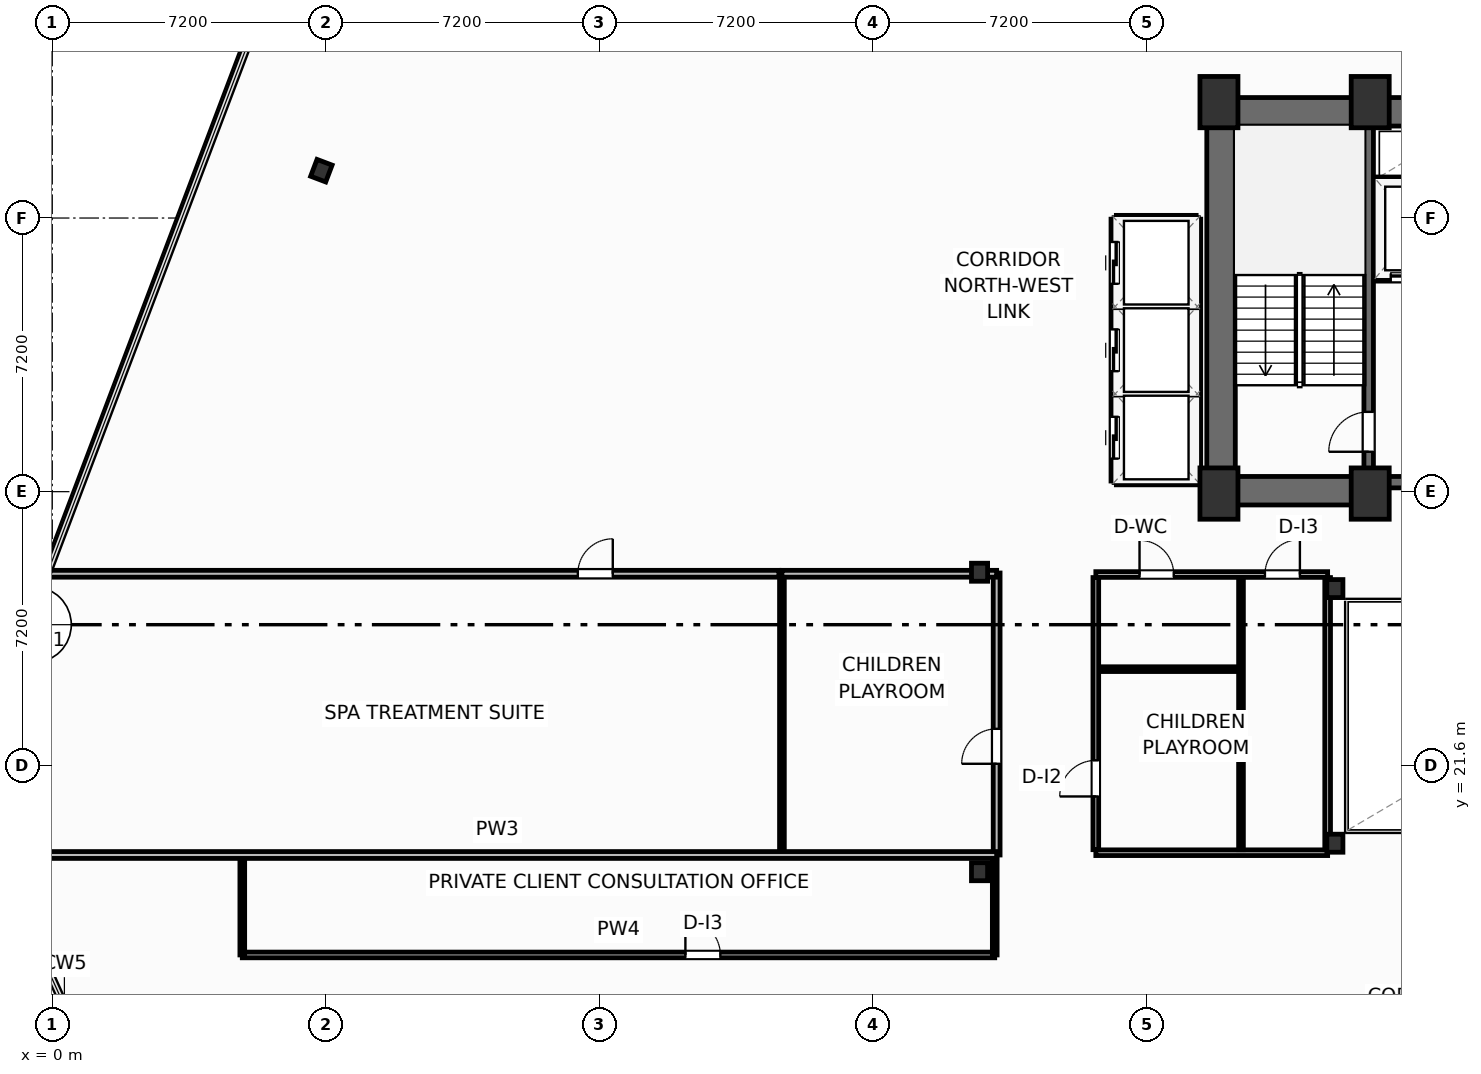
"""IFC4 building model, lengths in metres.
Left out: names, types, materials, properties, quantities, classifications, styles, units other than length and angle.
Written with IfcOpenShell. Run it as: python <this file> out.ifc"""

import sys

from ifc_helpers import new_model, si_unit, direction, frame, frame_2d, origin, origin_2d, place, context, subcontext, project, spatial, rectangle, i_section, extrude, element, fill, save


model = new_model("IFC4")
c1 = context("Model", 3, precision=1e-05, world=origin(), true_north=direction((0.0, 1.0)))
c2 = subcontext(c1, "Body", "Model", "MODEL_VIEW")
j1 = project(units=[si_unit("LENGTHUNIT", "METRE"), si_unit("PLANEANGLEUNIT", "RADIAN")], contexts=[c1])
p1 = place(None, origin())
s1 = spatial("IfcSite", under=j1, at=p1, CompositionType="ELEMENT")
p2 = place(p1, origin())
s2 = spatial("IfcBuilding", under=s1, at=p2, CompositionType="ELEMENT")
p3 = place(p2, frame((0.0, 0.0, 91.0)))
s3 = spatial("IfcBuildingStorey", under=s2, at=p3, CompositionType="ELEMENT", Elevation=91.0)
for number, where, z_axis, x_axis in (
    (1, (30.7, 28.75, 0.0), (0.0, 0.0, 1.0), (1.0, 0.0, 0.0)),
    (2, (34.68, 28.75, 0.0), (0.0, 0.0, 1.0), (1.0, 0.0, 0.0)),
    (3, (30.7, 39.05, 0.0), (0.0, 0.0, 1.0), (1.0, 0.0, 0.0)),
    (4, (34.68, 39.05, 0.0), (0.0, 0.0, 1.0), (1.0, 0.0, 0.0)),
):
    element("IfcColumn", number, at=place(p3, frame(where, z_axis=z_axis, x_axis=x_axis)), inside=s3, PredefinedType="COLUMN", context=c2, shape_type="SweptSolid", body=[
        extrude(rectangle(XDim=1.0, YDim=1.35, at=origin_2d()), origin(), (0.0, 0.0, 1.0), 3.7),
    ])
for number, where, z_axis, x_axis in (
    (5, (33.75, 19.55, 0.0), (0.0, 0.0, 1.0), (1.0, 0.0, 0.0)),
    (6, (33.75, 26.25, 0.0), (0.0, 0.0, 1.0), (1.0, 0.0, 0.0)),
    (7, (24.4, 18.8, 0.0), (0.0, 0.0, 1.0), (1.0, 0.0, 0.0)),
    (8, (24.4, 26.68, 0.0), (0.0, 0.0, 1.0), (1.0, 0.0, 0.0)),
):
    element("IfcColumn", number, at=place(p3, frame(where, z_axis=z_axis, x_axis=x_axis)), inside=s3, PredefinedType="COLUMN", context=c2, shape_type="SweptSolid", body=[
        extrude(i_section(OverallWidth=0.424, OverallDepth=0.474, WebThickness=0.048, FlangeThickness=0.077, FilletRadius=0.025, at=origin_2d()), origin(), (0.0, 0.0, 1.0), 3.7),
    ])
p4 = place(p3, frame((30.38, 38.795, 0.0), z_axis=(0.0, 0.0, 1.0), x_axis=(1.0, 0.0, 0.0)))
e9 = element("IfcWall", 9, at=p4, inside=s3, PredefinedType="SHEAR", context=c2, shape_type="SweptSolid", body=[
    extrude(rectangle(XDim=17.64, YDim=0.75, at=frame_2d((8.82, 0.0))), origin(), (0.0, 0.0, 1.0), 3.45),
])
p5 = place(p3, frame((30.755, 29.2, 0.0), z_axis=(0.0, 0.0, 1.0), x_axis=(0.0, 1.0, 0.0)))
e10 = element("IfcWall", 10, at=p5, inside=s3, PredefinedType="SHEAR", context=c2, shape_type="SweptSolid", body=[
    extrude(rectangle(XDim=9.22, YDim=0.75, at=frame_2d((4.61, 0.0))), origin(), (0.0, 0.0, 1.0), 3.45),
])
p6 = place(p3, frame((30.38, 28.825, 0.0), z_axis=(0.0, 0.0, 1.0), x_axis=(1.0, 0.0, 0.0)))
e11 = element("IfcWall", 11, at=p6, inside=s3, PredefinedType="SHEAR", context=c2, shape_type="SweptSolid", body=[
    extrude(rectangle(XDim=4.42, YDim=0.75, at=frame_2d((2.21, 0.0))), origin(), (0.0, 0.0, 1.0), 3.45),
])
p7 = place(p3, frame((34.8, 29.05, 0.0), z_axis=(0.0, 0.0, 1.0), x_axis=(1.0, 0.0, 0.0)))
e12 = element("IfcWall", 12, at=p7, inside=s3, PredefinedType="SHEAR", context=c2, shape_type="SweptSolid", body=[
    extrude(rectangle(XDim=8.8, YDim=0.3, at=frame_2d((4.4, 0.0))), origin(), (0.0, 0.0, 1.0), 3.45),
])
p8 = place(p7, frame((0.95, 0.0, 0.0)))
e13 = element("IfcOpeningElement", 13, at=p8, cuts=e12, PredefinedType="OPENING", context=c2, shape_type="SweptSolid", body=[
    extrude(rectangle(XDim=1.1, YDim=2.15, at=frame_2d((0.55, 1.075))), frame((0.0, 0.16, 0.0), z_axis=(0.0, -1.0, 0.0), x_axis=(1.0, 0.0, 0.0)), (0.0, 0.0, 1.0), 0.32),
])
p9 = place(p7, frame((6.75, 0.0, 0.0)))
e14 = element("IfcOpeningElement", 14, at=p9, cuts=e12, PredefinedType="OPENING", context=c2, shape_type="SweptSolid", body=[
    extrude(rectangle(XDim=1.1, YDim=2.15, at=frame_2d((0.55, 1.075))), frame((0.0, 0.16, 0.0), z_axis=(0.0, -1.0, 0.0), x_axis=(1.0, 0.0, 0.0)), (0.0, 0.0, 1.0), 0.32),
])
p10 = place(p7, frame((3.32, 0.0, 0.0)))
e15 = element("IfcOpeningElement", 15, at=p10, cuts=e12, PredefinedType="OPENING", context=c2, shape_type="SweptSolid", body=[
    extrude(rectangle(XDim=0.95, YDim=2.15, at=frame_2d((0.475, 1.075))), frame((0.0, 0.16, 0.0), z_axis=(0.0, -1.0, 0.0), x_axis=(1.0, 0.0, 0.0)), (0.0, 0.0, 1.0), 0.32),
])
p11 = place(p3, frame((34.64, 29.2, 0.0), z_axis=(0.0, 0.0, 1.0), x_axis=(0.0, 1.0, 0.0)))
e16 = element("IfcWall", 16, at=p11, inside=s3, PredefinedType="SHEAR", context=c2, shape_type="SweptSolid", body=[
    extrude(rectangle(XDim=9.22, YDim=0.25, at=frame_2d((4.61, 0.0))), origin(), (0.0, 0.0, 1.0), 3.45),
])
p12 = place(p11, frame((0.65, 0.0, 0.0)))
e17 = element("IfcOpeningElement", 17, at=p12, cuts=e16, PredefinedType="OPENING", context=c2, shape_type="SweptSolid", body=[
    extrude(rectangle(XDim=1.05, YDim=2.15, at=frame_2d((0.525, 1.075))), frame((0.0, 0.135, 0.0), z_axis=(0.0, -1.0, 0.0), x_axis=(1.0, 0.0, 0.0)), (0.0, 0.0, 1.0), 0.27),
])
p13 = place(p3, frame((7.081, 37.246, 0.0), z_axis=(0.0, 0.0, 1.0), x_axis=(0.935221751401, -0.354062530786, 0.0)))
e18 = element("IfcColumn", 18, at=p13, inside=s3, PredefinedType="COLUMN", context=c2, shape_type="SweptSolid", body=[
    extrude(i_section(OverallWidth=0.424, OverallDepth=0.474, WebThickness=0.048, FlangeThickness=0.077, FilletRadius=0.025, at=origin_2d()), origin(), (0.0, 0.0, 1.0), 3.7),
])
p14 = place(p3, frame((5.0, 16.61, 0.0), z_axis=(0.0, 0.0, 1.0), x_axis=(1.0, 0.0, 0.0)))
e19 = element("IfcWall", 19, at=p14, inside=s3, PredefinedType="PARTITIONING", context=c2, shape_type="SweptSolid", body=[
    extrude(rectangle(XDim=19.8, YDim=0.15, at=frame_2d((9.9, 0.0))), origin(), (0.0, 0.0, 1.0), 3.45),
])
p15 = place(p14, frame((11.66, 0.0, 0.0)))
e20 = element("IfcOpeningElement", 20, at=p15, cuts=e19, PredefinedType="OPENING", context=c2, shape_type="SweptSolid", body=[
    extrude(rectangle(XDim=0.92, YDim=2.05, at=frame_2d((0.46, 1.025))), frame((0.0, 0.085, 0.0), z_axis=(0.0, -1.0, 0.0), x_axis=(1.0, 0.0, 0.0)), (0.0, 0.0, 1.0), 0.17),
])
for number, where, z_axis, x_axis in (
    (21, (5.0, 16.61, 0.0), (0.0, 0.0, 1.0), (0.0, 1.0, 0.0)),
    (22, (24.8, 16.61, 0.0), (0.0, 0.0, 1.0), (0.0, 1.0, 0.0)),
):
    element("IfcWall", number, at=place(p3, frame(where, z_axis=z_axis, x_axis=x_axis)), inside=s3, PredefinedType="PARTITIONING", context=c2, shape_type="SweptSolid", body=[
        extrude(rectangle(XDim=2.63, YDim=0.125, at=frame_2d((1.315, 0.0))), origin(), (0.0, 0.0, 1.0), 3.45),
    ])
p16 = place(p3, frame((-0.094, 26.64, 0.0), z_axis=(0.0, 0.0, 1.0), x_axis=(1.0, 0.0, 0.0)))
e23 = element("IfcWall", 23, at=p16, inside=s3, PredefinedType="PARTITIONING", context=c2, shape_type="SweptSolid", body=[
    extrude(rectangle(XDim=19.214, YDim=0.18, at=frame_2d((9.607, 0.0))), origin(), (0.0, 0.0, 1.0), 3.45),
])
p17 = place(p16, frame((13.923, 0.0, 0.0)))
e24 = element("IfcOpeningElement", 24, at=p17, cuts=e23, PredefinedType="OPENING", context=c2, shape_type="SweptSolid", body=[
    extrude(rectangle(XDim=0.92, YDim=2.05, at=frame_2d((0.46, 1.025))), frame((0.0, 0.1, 0.0), z_axis=(0.0, -1.0, 0.0), x_axis=(1.0, 0.0, 0.0)), (0.0, 0.0, 1.0), 0.2),
])
p18 = place(p3, frame((24.85, 19.24, 0.0), z_axis=(0.0, 0.0, 1.0), x_axis=(0.0, 1.0, 0.0)))
e25 = element("IfcWall", 25, at=p18, inside=s3, PredefinedType="PARTITIONING", context=c2, shape_type="SweptSolid", body=[
    extrude(rectangle(XDim=7.42, YDim=0.18, at=frame_2d((3.71, 0.0))), origin(), (0.0, 0.0, 1.0), 3.45),
])
p19 = place(p18, frame((2.4, 0.0, 0.0)))
e26 = element("IfcOpeningElement", 26, at=p19, cuts=e25, PredefinedType="OPENING", context=c2, shape_type="SweptSolid", body=[
    extrude(rectangle(XDim=0.92, YDim=2.05, at=frame_2d((0.46, 1.025))), frame((0.0, 0.1, 0.0), z_axis=(0.0, -1.0, 0.0), x_axis=(1.0, 0.0, 0.0)), (0.0, 0.0, 1.0), 0.2),
])
p20 = place(p3, frame((19.2, 19.24, 0.0), z_axis=(0.0, 0.0, 1.0), x_axis=(0.0, 1.0, 0.0)))
e27 = element("IfcWall", 27, at=p20, inside=s3, PredefinedType="PARTITIONING", context=c2, shape_type="SweptSolid", body=[
    extrude(rectangle(XDim=7.42, YDim=0.125, at=frame_2d((3.71, 0.0))), origin(), (0.0, 0.0, 1.0), 3.45),
])
p21 = place(p3, frame((-1.432, 19.24, 0.0), z_axis=(0.0, 0.0, 1.0), x_axis=(1.0, 0.0, 0.0)))
e28 = element("IfcWall", 28, at=p21, inside=s3, PredefinedType="PARTITIONING", context=c2, shape_type="SweptSolid", body=[
    extrude(rectangle(XDim=26.282, YDim=0.18, at=frame_2d((13.141, 0.0))), origin(), (0.0, 0.0, 1.0), 3.45),
])
p22 = place(p3, frame((19.2, 26.64, 0.0), z_axis=(0.0, 0.0, 1.0), x_axis=(1.0, 0.0, 0.0)))
e29 = element("IfcWall", 29, at=p22, inside=s3, PredefinedType="PARTITIONING", context=c2, shape_type="SweptSolid", body=[
    extrude(rectangle(XDim=5.65, YDim=0.18, at=frame_2d((2.825, 0.0))), origin(), (0.0, 0.0, 1.0), 2.662),
])
p23 = place(p3, frame((34.8, 34.44, 0.0), z_axis=(0.0, 0.0, 1.0), x_axis=(1.0, 0.0, 0.0)))
e30 = element("IfcWall", 30, at=p23, inside=s3, PredefinedType="PARTITIONING", context=c2, shape_type="SweptSolid", body=[
    extrude(rectangle(XDim=2.18, YDim=0.2, at=frame_2d((1.09, 0.0))), origin(), (0.0, 0.0, 1.0), 3.45),
])
p24 = place(p23, frame((0.42, 0.0, 0.0)))
e31 = element("IfcOpeningElement", 31, at=p24, cuts=e30, PredefinedType="OPENING", context=c2, shape_type="SweptSolid", body=[
    extrude(rectangle(XDim=1.2, YDim=2.2, at=frame_2d((0.6, 1.1))), frame((0.0, 0.11, 0.0), z_axis=(0.0, -1.0, 0.0), x_axis=(1.0, 0.0, 0.0)), (0.0, 0.0, 1.0), 0.22),
])
p25 = place(p3, frame((34.8, 36.98, 0.0), z_axis=(0.0, 0.0, 1.0), x_axis=(1.0, 0.0, 0.0)))
e32 = element("IfcWall", 32, at=p25, inside=s3, PredefinedType="PARTITIONING", context=c2, shape_type="SweptSolid", body=[
    extrude(rectangle(XDim=2.18, YDim=0.2, at=frame_2d((1.09, 0.0))), origin(), (0.0, 0.0, 1.0), 3.45),
])
p26 = place(p3, frame((27.46, 19.3, 0.0), z_axis=(0.0, 0.0, 1.0), x_axis=(1.0, 0.0, 0.0)))
e33 = element("IfcWall", 33, at=p26, inside=s3, PredefinedType="PARTITIONING", context=c2, shape_type="SweptSolid", body=[
    extrude(rectangle(XDim=6.1, YDim=0.15, at=frame_2d((3.05, 0.0))), origin(), (0.0, 0.0, 1.0), 2.662),
])
p27 = place(p3, frame((27.46, 26.62, 0.0), z_axis=(0.0, 0.0, 1.0), x_axis=(1.0, 0.0, 0.0)))
e34 = element("IfcWall", 34, at=p27, inside=s3, PredefinedType="PARTITIONING", context=c2, shape_type="SweptSolid", body=[
    extrude(rectangle(XDim=6.1, YDim=0.15, at=frame_2d((3.05, 0.0))), origin(), (0.0, 0.0, 1.0), 2.662),
])
p28 = place(p27, frame((1.15, 0.0, 0.0)))
e35 = element("IfcOpeningElement", 35, at=p28, cuts=e34, PredefinedType="OPENING", context=c2, shape_type="SweptSolid", body=[
    extrude(rectangle(XDim=0.9, YDim=2.05, at=frame_2d((0.45, 1.025))), frame((0.0, 0.085, 0.0), z_axis=(0.0, -1.0, 0.0), x_axis=(1.0, 0.0, 0.0)), (0.0, 0.0, 1.0), 0.17),
])
p29 = place(p27, frame((4.45, 0.0, 0.0)))
e36 = element("IfcOpeningElement", 36, at=p29, cuts=e34, PredefinedType="OPENING", context=c2, shape_type="SweptSolid", body=[
    extrude(rectangle(XDim=0.92, YDim=2.05, at=frame_2d((0.46, 1.025))), frame((0.0, 0.085, 0.0), z_axis=(0.0, -1.0, 0.0), x_axis=(1.0, 0.0, 0.0)), (0.0, 0.0, 1.0), 0.17),
])
p30 = place(p3, frame((31.28, 19.38, 0.0), z_axis=(0.0, 0.0, 1.0), x_axis=(0.0, 1.0, 0.0)))
e37 = element("IfcWall", 37, at=p30, inside=s3, PredefinedType="PARTITIONING", context=c2, shape_type="SweptSolid", body=[
    extrude(rectangle(XDim=7.16, YDim=0.125, at=frame_2d((3.58, 0.0))), origin(), (0.0, 0.0, 1.0), 3.45),
])
p31 = place(p3, frame((27.52, 24.13, 0.0), z_axis=(0.0, 0.0, 1.0), x_axis=(1.0, 0.0, 0.0)))
e38 = element("IfcWall", 38, at=p31, inside=s3, PredefinedType="PARTITIONING", context=c2, shape_type="SweptSolid", body=[
    extrude(rectangle(XDim=3.7, YDim=0.125, at=frame_2d((1.85, 0.0))), origin(), (0.0, 0.0, 1.0), 3.45),
])
p32 = place(p3, frame((27.46, 19.38, 0.0), z_axis=(0.0, 0.0, 1.0), x_axis=(0.0, 1.0, 0.0)))
e39 = element("IfcWall", 39, at=p32, inside=s3, PredefinedType="PARTITIONING", context=c2, shape_type="SweptSolid", body=[
    extrude(rectangle(XDim=7.16, YDim=0.15, at=frame_2d((3.58, 0.0))), origin(), (0.0, 0.0, 1.0), 3.45),
])
p33 = place(p32, frame((1.4, 0.0, 0.0)))
e40 = element("IfcOpeningElement", 40, at=p33, cuts=e39, PredefinedType="OPENING", context=c2, shape_type="SweptSolid", body=[
    extrude(rectangle(XDim=0.95, YDim=2.05, at=frame_2d((0.475, 1.025))), frame((0.0, 0.085, 0.0), z_axis=(0.0, -1.0, 0.0), x_axis=(1.0, 0.0, 0.0)), (0.0, 0.0, 1.0), 0.17),
])
p34 = place(p3, frame((33.56, 19.38, 0.0), z_axis=(0.0, 0.0, 1.0), x_axis=(0.0, 1.0, 0.0)))
e41 = element("IfcWall", 41, at=p34, inside=s3, PredefinedType="PARTITIONING", context=c2, shape_type="SweptSolid", body=[
    extrude(rectangle(XDim=7.16, YDim=0.15, at=frame_2d((3.58, 0.0))), origin(), (0.0, 0.0, 1.0), 2.824),
])
for number, where, z_axis, x_axis in (
    (42, (28.02, 31.375, 0.0), (0.0, 0.0, 1.0), (1.0, 0.0, 0.0)),
    (43, (28.02, 33.675, 0.0), (0.0, 0.0, 1.0), (1.0, 0.0, 0.0)),
):
    element("IfcWall", number, at=place(p3, frame(where, z_axis=z_axis, x_axis=x_axis)), inside=s3, PredefinedType="PARTITIONING", context=c2, shape_type="SweptSolid", body=[
        extrude(rectangle(XDim=2.06, YDim=0.2, at=frame_2d((1.03, 0.0))), origin(), (0.0, 0.0, 1.0), 3.45),
    ])
for number, where, z_axis, x_axis in (
    (44, (28.0, 29.08, 0.0), (0.0, 0.0, 1.0), (1.0, 0.0, 0.0)),
    (45, (28.0, 35.97, 0.0), (0.0, 0.0, 1.0), (1.0, 0.0, 0.0)),
):
    element("IfcWall", number, at=place(p3, frame(where, z_axis=z_axis, x_axis=x_axis)), inside=s3, PredefinedType="PARTITIONING", context=c2, shape_type="SweptSolid", body=[
        extrude(rectangle(XDim=2.1, YDim=0.2, at=frame_2d((1.05, 0.0))), origin(), (0.0, 0.0, 1.0), 3.45),
    ])
p35 = place(p3, frame((30.12, 29.08, 0.0), z_axis=(0.0, 0.0, 1.0), x_axis=(0.0, 1.0, 0.0)))
e46 = element("IfcWall", 46, at=p35, inside=s3, PredefinedType="PARTITIONING", context=c2, shape_type="SweptSolid", body=[
    extrude(rectangle(XDim=6.89, YDim=0.2, at=frame_2d((3.445, 0.0))), origin(), (0.0, 0.0, 1.0), 3.45),
])
p36 = place(p3, frame((27.96, 29.08, 0.0), z_axis=(0.0, 0.0, 1.0), x_axis=(0.0, 1.0, 0.0)))
e47 = element("IfcWall", 47, at=p36, inside=s3, PredefinedType="PARTITIONING", context=c2, shape_type="SweptSolid", body=[
    extrude(rectangle(XDim=6.89, YDim=0.2, at=frame_2d((3.445, 0.0))), origin(), (0.0, 0.0, 1.0), 3.45),
])
p37 = place(p36, frame((0.59, 0.0, 0.0)))
e48 = element("IfcOpeningElement", 48, at=p37, cuts=e47, PredefinedType="OPENING", context=c2, shape_type="SweptSolid", body=[
    extrude(rectangle(XDim=1.1, YDim=2.15, at=frame_2d((0.55, 1.075))), frame((0.0, 0.11, 0.0), z_axis=(0.0, -1.0, 0.0), x_axis=(1.0, 0.0, 0.0)), (0.0, 0.0, 1.0), 0.22),
])
p38 = place(p36, frame((2.89, 0.0, 0.0)))
e49 = element("IfcOpeningElement", 49, at=p38, cuts=e47, PredefinedType="OPENING", context=c2, shape_type="SweptSolid", body=[
    extrude(rectangle(XDim=1.1, YDim=2.15, at=frame_2d((0.55, 1.075))), frame((0.0, 0.11, 0.0), z_axis=(0.0, -1.0, 0.0), x_axis=(1.0, 0.0, 0.0)), (0.0, 0.0, 1.0), 0.22),
])
p39 = place(p36, frame((5.19, 0.0, 0.0)))
e50 = element("IfcOpeningElement", 50, at=p39, cuts=e47, PredefinedType="OPENING", context=c2, shape_type="SweptSolid", body=[
    extrude(rectangle(XDim=1.1, YDim=2.15, at=frame_2d((0.55, 1.075))), frame((0.0, 0.11, 0.0), z_axis=(0.0, -1.0, 0.0), x_axis=(1.0, 0.0, 0.0)), (0.0, 0.0, 1.0), 0.22),
])
p40 = place(p15, origin())
e51 = element("IfcDoor", 51, at=p40, inside=s3, OperationType="SINGLE_SWING_LEFT", PredefinedType="DOOR", context=c2, shape_type="SweptSolid", body=[
    extrude(rectangle(XDim=0.92, YDim=2.05, at=frame_2d((0.46, 1.025))), frame((0.0, 0.025, 0.0), z_axis=(0.0, -1.0, 0.0), x_axis=(1.0, 0.0, 0.0)), (0.0, 0.0, 1.0), 0.05),
])
fill(e20, e51)
p41 = place(p17, origin())
e52 = element("IfcDoor", 52, at=p41, inside=s3, OperationType="SINGLE_SWING_RIGHT", PredefinedType="DOOR", context=c2, shape_type="SweptSolid", body=[
    extrude(rectangle(XDim=0.92, YDim=2.05, at=frame_2d((0.46, 1.025))), frame((0.0, 0.025, 0.0), z_axis=(0.0, -1.0, 0.0), x_axis=(1.0, 0.0, 0.0)), (0.0, 0.0, 1.0), 0.05),
])
fill(e24, e52)
p42 = place(p19, origin())
e53 = element("IfcDoor", 53, at=p42, inside=s3, OperationType="SINGLE_SWING_LEFT", PredefinedType="DOOR", context=c2, shape_type="SweptSolid", body=[
    extrude(rectangle(XDim=0.92, YDim=2.05, at=frame_2d((0.46, 1.025))), frame((0.0, 0.025, 0.0), z_axis=(0.0, -1.0, 0.0), x_axis=(1.0, 0.0, 0.0)), (0.0, 0.0, 1.0), 0.05),
])
fill(e26, e53)
p43 = place(p12, origin())
e54 = element("IfcDoor", 54, at=p43, inside=s3, OperationType="SINGLE_SWING_LEFT", PredefinedType="DOOR", context=c2, shape_type="SweptSolid", body=[
    extrude(rectangle(XDim=1.05, YDim=2.15, at=frame_2d((0.525, 1.075))), frame((0.0, 0.025, 0.0), z_axis=(0.0, -1.0, 0.0), x_axis=(1.0, 0.0, 0.0)), (0.0, 0.0, 1.0), 0.05),
])
fill(e17, e54)
p44 = place(p24, origin())
e55 = element("IfcDoor", 55, at=p44, inside=s3, OperationType="SLIDING_TO_LEFT", PredefinedType="DOOR", context=c2, shape_type="SweptSolid", body=[
    extrude(rectangle(XDim=1.2, YDim=2.2, at=frame_2d((0.6, 1.1))), frame((0.0, 0.025, 0.0), z_axis=(0.0, -1.0, 0.0), x_axis=(1.0, 0.0, 0.0)), (0.0, 0.0, 1.0), 0.05),
])
fill(e31, e55)
p45 = place(p28, origin())
e56 = element("IfcDoor", 56, at=p45, inside=s3, OperationType="SINGLE_SWING_LEFT", PredefinedType="DOOR", context=c2, shape_type="SweptSolid", body=[
    extrude(rectangle(XDim=0.9, YDim=2.05, at=frame_2d((0.45, 1.025))), frame((0.0, 0.025, 0.0), z_axis=(0.0, -1.0, 0.0), x_axis=(1.0, 0.0, 0.0)), (0.0, 0.0, 1.0), 0.05),
])
fill(e35, e56)
p46 = place(p29, origin())
e57 = element("IfcDoor", 57, at=p46, inside=s3, OperationType="SINGLE_SWING_RIGHT", PredefinedType="DOOR", context=c2, shape_type="SweptSolid", body=[
    extrude(rectangle(XDim=0.92, YDim=2.05, at=frame_2d((0.46, 1.025))), frame((0.0, 0.025, 0.0), z_axis=(0.0, -1.0, 0.0), x_axis=(1.0, 0.0, 0.0)), (0.0, 0.0, 1.0), 0.05),
])
fill(e36, e57)
p47 = place(p33, origin())
e58 = element("IfcDoor", 58, at=p47, inside=s3, OperationType="SINGLE_SWING_LEFT", PredefinedType="DOOR", context=c2, shape_type="SweptSolid", body=[
    extrude(rectangle(XDim=0.95, YDim=2.05, at=frame_2d((0.475, 1.025))), frame((0.0, 0.025, 0.0), z_axis=(0.0, -1.0, 0.0), x_axis=(1.0, 0.0, 0.0)), (0.0, 0.0, 1.0), 0.05),
])
fill(e40, e58)
p48 = place(p37, origin())
e59 = element("IfcDoor", 59, at=p48, inside=s3, OperationType="SLIDING_TO_LEFT", PredefinedType="DOOR", context=c2, shape_type="SweptSolid", body=[
    extrude(rectangle(XDim=1.1, YDim=2.15, at=frame_2d((0.55, 1.075))), frame((0.0, 0.025, 0.0), z_axis=(0.0, -1.0, 0.0), x_axis=(1.0, 0.0, 0.0)), (0.0, 0.0, 1.0), 0.05),
])
fill(e48, e59)
p49 = place(p38, origin())
e60 = element("IfcDoor", 60, at=p49, inside=s3, OperationType="SLIDING_TO_LEFT", PredefinedType="DOOR", context=c2, shape_type="SweptSolid", body=[
    extrude(rectangle(XDim=1.1, YDim=2.15, at=frame_2d((0.55, 1.075))), frame((0.0, 0.025, 0.0), z_axis=(0.0, -1.0, 0.0), x_axis=(1.0, 0.0, 0.0)), (0.0, 0.0, 1.0), 0.05),
])
fill(e49, e60)
p50 = place(p39, origin())
e61 = element("IfcDoor", 61, at=p50, inside=s3, OperationType="SLIDING_TO_LEFT", PredefinedType="DOOR", context=c2, shape_type="SweptSolid", body=[
    extrude(rectangle(XDim=1.1, YDim=2.15, at=frame_2d((0.55, 1.075))), frame((0.0, 0.025, 0.0), z_axis=(0.0, -1.0, 0.0), x_axis=(1.0, 0.0, 0.0)), (0.0, 0.0, 1.0), 0.05),
])
fill(e50, e61)
save(model, sys.argv[1])
